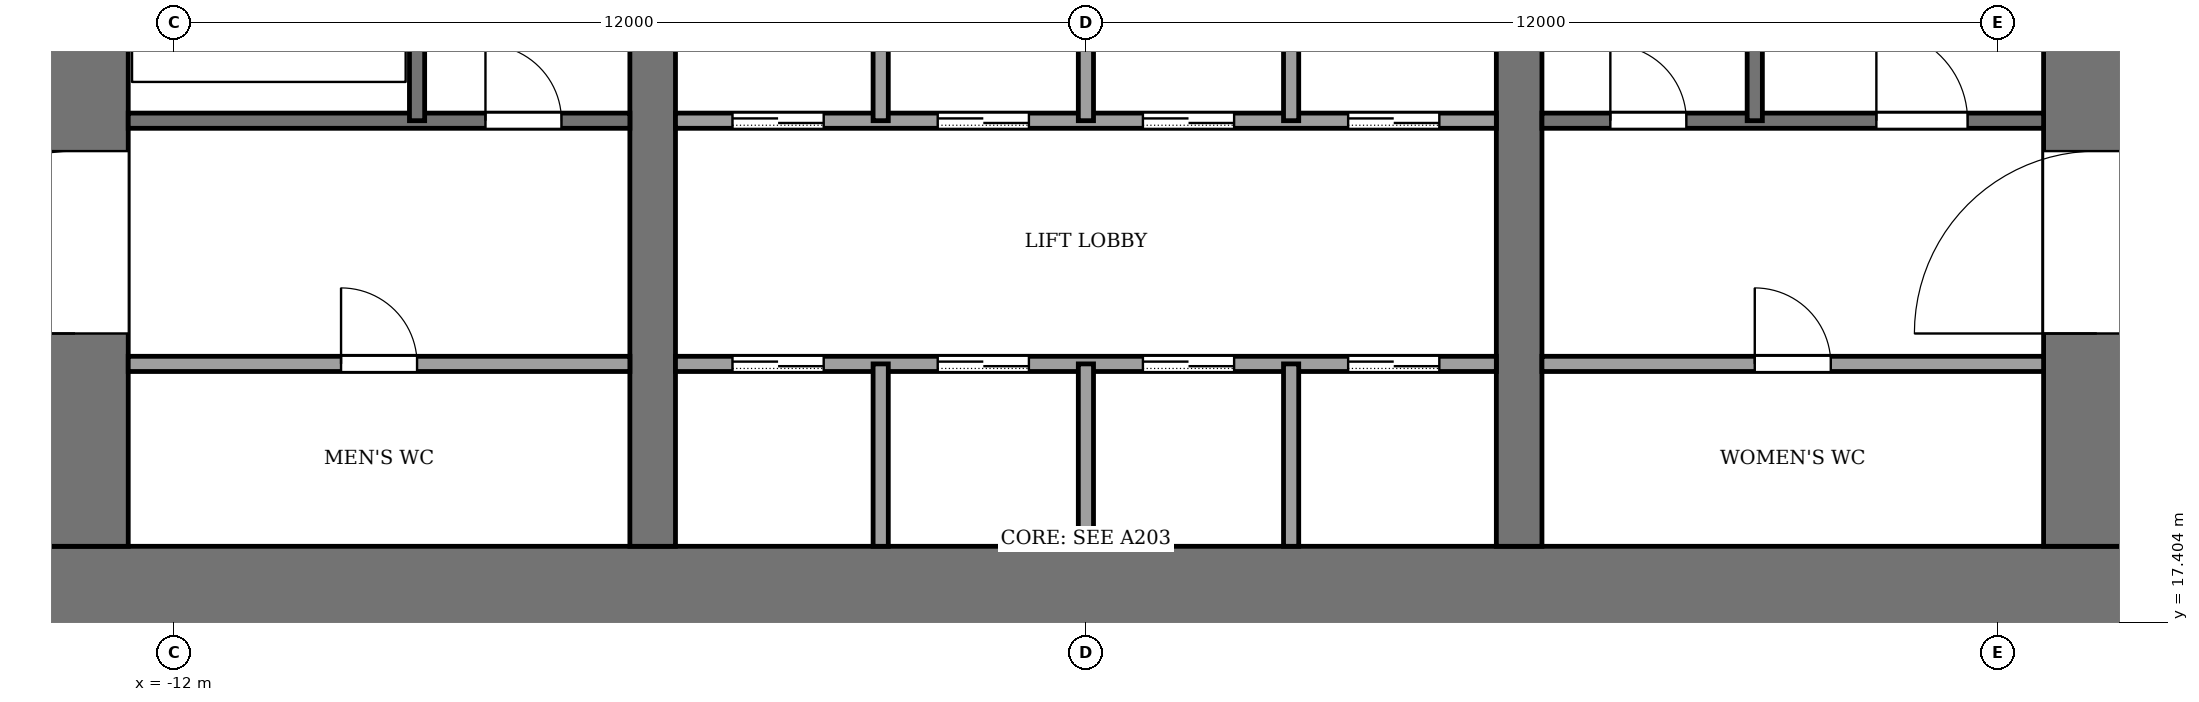
"""IFC4 building model, lengths in metres.
Left out: names, types, materials, properties, quantities, classifications, styles, units other than length and angle.
Written with IfcOpenShell. Run it as: python <this file> out.ifc"""

import sys

from ifc_helpers import new_model, si_unit, direction, frame, frame_2d, origin, place, context, subcontext, project, spatial, rectangle, extrude, element, fill, save


model = new_model("IFC4")
c1 = context("Model", 3, precision=1e-05, world=origin(), true_north=direction((0.0, 1.0)))
c2 = subcontext(c1, "Body", "Model", "MODEL_VIEW")
j1 = project(units=[si_unit("LENGTHUNIT", "METRE"), si_unit("PLANEANGLEUNIT", "RADIAN")], contexts=[c1])
p1 = place(None, origin())
s1 = spatial("IfcSite", under=j1, at=p1, CompositionType="ELEMENT")
p2 = place(p1, origin())
s2 = spatial("IfcBuilding", under=s1, at=p2, CompositionType="ELEMENT")
p3 = place(p2, frame((0.0, 0.0, 9.0)))
s3 = spatial("IfcBuildingStorey", under=s2, at=p3, CompositionType="ELEMENT", Elevation=9.0)
p4 = place(p3, frame((-14.0, 17.7, -0.13), z_axis=(0.0, 0.0, 1.0), x_axis=(1.0, 0.0, 0.0)))
e1 = element("IfcWall", 1, at=p4, inside=s3, PredefinedType="SHEAR", context=c2, shape_type="SweptSolid", body=[
    extrude(rectangle(XDim=28.0, YDim=1.4, at=frame_2d((14.0, 0.0))), origin(), (0.0, 0.0, 1.0), 5.0),
])
p5 = place(p3, frame((-13.3, 18.4, -0.13), z_axis=(0.0, 0.0, 1.0), x_axis=(0.0, 1.0, 0.0)))
e2 = element("IfcWall", 2, at=p5, inside=s3, PredefinedType="SHEAR", context=c2, shape_type="SweptSolid", body=[
    extrude(rectangle(XDim=19.2, YDim=1.4, at=frame_2d((9.6, 0.0))), origin(), (0.0, 0.0, 1.0), 5.0),
])
p6 = place(p5, frame((2.8, 0.0, 0.13)))
e3 = element("IfcOpeningElement", 3, at=p6, cuts=e2, PredefinedType="OPENING", context=c2, shape_type="SweptSolid", body=[
    extrude(rectangle(XDim=2.4, YDim=2.4, at=frame_2d((1.2, 1.2))), frame((0.0, 0.71, 0.0), z_axis=(0.0, -1.0, 0.0), x_axis=(1.0, 0.0, 0.0)), (0.0, 0.0, 1.0), 1.42),
])
p7 = place(p5, frame((13.4, 0.0, 0.13)))
e4 = element("IfcOpeningElement", 4, at=p7, cuts=e2, PredefinedType="OPENING", context=c2, shape_type="SweptSolid", body=[
    extrude(rectangle(XDim=1.4, YDim=2.2, at=frame_2d((0.7, 1.1))), frame((0.0, 0.71, 0.0), z_axis=(0.0, -1.0, 0.0), x_axis=(1.0, 0.0, 0.0)), (0.0, 0.0, 1.0), 1.42),
])
p8 = place(p3, frame((13.3, 18.4, -0.13), z_axis=(0.0, 0.0, 1.0), x_axis=(0.0, 1.0, 0.0)))
e5 = element("IfcWall", 5, at=p8, inside=s3, PredefinedType="SHEAR", context=c2, shape_type="SweptSolid", body=[
    extrude(rectangle(XDim=19.2, YDim=1.4, at=frame_2d((9.6, 0.0))), origin(), (0.0, 0.0, 1.0), 5.0),
])
p9 = place(p8, frame((2.8, 0.0, 0.13)))
e6 = element("IfcOpeningElement", 6, at=p9, cuts=e5, PredefinedType="OPENING", context=c2, shape_type="SweptSolid", body=[
    extrude(rectangle(XDim=2.4, YDim=2.4, at=frame_2d((1.2, 1.2))), frame((0.0, 0.71, 0.0), z_axis=(0.0, -1.0, 0.0), x_axis=(1.0, 0.0, 0.0)), (0.0, 0.0, 1.0), 1.42),
])
p10 = place(p8, frame((13.3, 0.0, 0.13)))
e7 = element("IfcOpeningElement", 7, at=p10, cuts=e5, PredefinedType="OPENING", context=c2, shape_type="SweptSolid", body=[
    extrude(rectangle(XDim=2.4, YDim=2.4, at=frame_2d((1.2, 1.2))), frame((0.0, 0.71, 0.0), z_axis=(0.0, -1.0, 0.0), x_axis=(1.0, 0.0, 0.0)), (0.0, 0.0, 1.0), 1.42),
])
p11 = place(p3, frame((-5.7, 18.4, -0.13), z_axis=(0.0, 0.0, 1.0), x_axis=(0.0, 1.0, 0.0)))
e8 = element("IfcWall", 8, at=p11, inside=s3, PredefinedType="SHEAR", context=c2, shape_type="SweptSolid", body=[
    extrude(rectangle(XDim=19.2, YDim=0.6, at=frame_2d((9.6, 0.0))), origin(), (0.0, 0.0, 1.0), 5.0),
])
p12 = place(p11, frame((8.35, 0.0, 0.13)))
e9 = element("IfcOpeningElement", 9, at=p12, cuts=e8, PredefinedType="OPENING", context=c2, shape_type="SweptSolid", body=[
    extrude(rectangle(XDim=0.9, YDim=2.1, at=frame_2d((0.45, 1.05))), frame((0.0, 0.31, 0.0), z_axis=(0.0, -1.0, 0.0), x_axis=(1.0, 0.0, 0.0)), (0.0, 0.0, 1.0), 0.62),
])
p13 = place(p3, frame((5.7, 18.4, -0.13), z_axis=(0.0, 0.0, 1.0), x_axis=(0.0, 1.0, 0.0)))
e10 = element("IfcWall", 10, at=p13, inside=s3, PredefinedType="SHEAR", context=c2, shape_type="SweptSolid", body=[
    extrude(rectangle(XDim=19.2, YDim=0.6, at=frame_2d((9.6, 0.0))), origin(), (0.0, 0.0, 1.0), 5.0),
])
p14 = place(p13, frame((13.3, 0.0, 0.13)))
e11 = element("IfcOpeningElement", 11, at=p14, cuts=e10, PredefinedType="OPENING", context=c2, shape_type="SweptSolid", body=[
    extrude(rectangle(XDim=2.4, YDim=2.4, at=frame_2d((1.2, 1.2))), frame((0.0, 0.31, 0.0), z_axis=(0.0, -1.0, 0.0), x_axis=(1.0, 0.0, 0.0)), (0.0, 0.0, 1.0), 0.62),
])
p15 = place(p3, frame((-12.6, 20.8, 0.0), z_axis=(0.0, 0.0, 1.0), x_axis=(1.0, 0.0, 0.0)))
e12 = element("IfcWall", 12, at=p15, inside=s3, PredefinedType="PARTITIONING", context=c2, shape_type="SweptSolid", body=[
    extrude(rectangle(XDim=6.6, YDim=0.2, at=frame_2d((3.3, 0.0))), origin(), (0.0, 0.0, 1.0), 4.87),
])
p16 = place(p15, frame((2.8, 0.0, 0.0)))
e13 = element("IfcOpeningElement", 13, at=p16, cuts=e12, PredefinedType="OPENING", context=c2, shape_type="SweptSolid", body=[
    extrude(rectangle(XDim=1.0, YDim=2.1, at=frame_2d((0.5, 1.05))), frame((0.0, 0.11, 0.0), z_axis=(0.0, -1.0, 0.0), x_axis=(1.0, 0.0, 0.0)), (0.0, 0.0, 1.0), 0.22),
])
p17 = place(p3, frame((-5.4, 20.8, 0.0), z_axis=(0.0, 0.0, 1.0), x_axis=(1.0, 0.0, 0.0)))
e14 = element("IfcWall", 14, at=p17, inside=s3, PredefinedType="PARTITIONING", context=c2, shape_type="SweptSolid", body=[
    extrude(rectangle(XDim=10.8, YDim=0.2, at=frame_2d((5.4, 0.0))), origin(), (0.0, 0.0, 1.0), 4.87),
])
p18 = place(p17, frame((0.75, 0.0, 0.0)))
e15 = element("IfcOpeningElement", 15, at=p18, cuts=e14, PredefinedType="OPENING", context=c2, shape_type="SweptSolid", body=[
    extrude(rectangle(XDim=1.2, YDim=2.2, at=frame_2d((0.6, 1.1))), frame((0.0, 0.11, 0.0), z_axis=(0.0, -1.0, 0.0), x_axis=(1.0, 0.0, 0.0)), (0.0, 0.0, 1.0), 0.22),
])
p19 = place(p17, frame((3.45, 0.0, 0.0)))
e16 = element("IfcOpeningElement", 16, at=p19, cuts=e14, PredefinedType="OPENING", context=c2, shape_type="SweptSolid", body=[
    extrude(rectangle(XDim=1.2, YDim=2.2, at=frame_2d((0.6, 1.1))), frame((0.0, 0.11, 0.0), z_axis=(0.0, -1.0, 0.0), x_axis=(1.0, 0.0, 0.0)), (0.0, 0.0, 1.0), 0.22),
])
p20 = place(p17, frame((6.15, 0.0, 0.0)))
e17 = element("IfcOpeningElement", 17, at=p20, cuts=e14, PredefinedType="OPENING", context=c2, shape_type="SweptSolid", body=[
    extrude(rectangle(XDim=1.2, YDim=2.2, at=frame_2d((0.6, 1.1))), frame((0.0, 0.11, 0.0), z_axis=(0.0, -1.0, 0.0), x_axis=(1.0, 0.0, 0.0)), (0.0, 0.0, 1.0), 0.22),
])
p21 = place(p17, frame((8.85, 0.0, 0.0)))
e18 = element("IfcOpeningElement", 18, at=p21, cuts=e14, PredefinedType="OPENING", context=c2, shape_type="SweptSolid", body=[
    extrude(rectangle(XDim=1.2, YDim=2.2, at=frame_2d((0.6, 1.1))), frame((0.0, 0.11, 0.0), z_axis=(0.0, -1.0, 0.0), x_axis=(1.0, 0.0, 0.0)), (0.0, 0.0, 1.0), 0.22),
])
p22 = place(p3, frame((6.0, 20.8, 0.0), z_axis=(0.0, 0.0, 1.0), x_axis=(1.0, 0.0, 0.0)))
e19 = element("IfcWall", 19, at=p22, inside=s3, PredefinedType="PARTITIONING", context=c2, shape_type="SweptSolid", body=[
    extrude(rectangle(XDim=6.6, YDim=0.2, at=frame_2d((3.3, 0.0))), origin(), (0.0, 0.0, 1.0), 4.87),
])
p23 = place(p22, frame((2.8, 0.0, 0.0)))
e20 = element("IfcOpeningElement", 20, at=p23, cuts=e19, PredefinedType="OPENING", context=c2, shape_type="SweptSolid", body=[
    extrude(rectangle(XDim=1.0, YDim=2.1, at=frame_2d((0.5, 1.05))), frame((0.0, 0.11, 0.0), z_axis=(0.0, -1.0, 0.0), x_axis=(1.0, 0.0, 0.0)), (0.0, 0.0, 1.0), 0.22),
])
p24 = place(p3, frame((-12.6, 24.0, 0.0), z_axis=(0.0, 0.0, 1.0), x_axis=(1.0, 0.0, 0.0)))
e21 = element("IfcWall", 21, at=p24, inside=s3, PredefinedType="PARTITIONING", context=c2, shape_type="SweptSolid", body=[
    extrude(rectangle(XDim=6.6, YDim=0.2, at=frame_2d((3.3, 0.0))), origin(), (0.0, 0.0, 1.0), 4.87),
])
p25 = place(p24, frame((4.7, 0.0, 0.0)))
e22 = element("IfcOpeningElement", 22, at=p25, cuts=e21, PredefinedType="OPENING", context=c2, shape_type="SweptSolid", body=[
    extrude(rectangle(XDim=1.0, YDim=2.1, at=frame_2d((0.5, 1.05))), frame((0.0, 0.11, 0.0), z_axis=(0.0, -1.0, 0.0), x_axis=(1.0, 0.0, 0.0)), (0.0, 0.0, 1.0), 0.22),
])
p26 = place(p3, frame((-5.4, 24.0, 0.0), z_axis=(0.0, 0.0, 1.0), x_axis=(1.0, 0.0, 0.0)))
e23 = element("IfcWall", 23, at=p26, inside=s3, PredefinedType="PARTITIONING", context=c2, shape_type="SweptSolid", body=[
    extrude(rectangle(XDim=10.8, YDim=0.2, at=frame_2d((5.4, 0.0))), origin(), (0.0, 0.0, 1.0), 4.87),
])
p27 = place(p26, frame((0.75, 0.0, 0.0)))
e24 = element("IfcOpeningElement", 24, at=p27, cuts=e23, PredefinedType="OPENING", context=c2, shape_type="SweptSolid", body=[
    extrude(rectangle(XDim=1.2, YDim=2.2, at=frame_2d((0.6, 1.1))), frame((0.0, 0.11, 0.0), z_axis=(0.0, -1.0, 0.0), x_axis=(1.0, 0.0, 0.0)), (0.0, 0.0, 1.0), 0.22),
])
p28 = place(p26, frame((3.45, 0.0, 0.0)))
e25 = element("IfcOpeningElement", 25, at=p28, cuts=e23, PredefinedType="OPENING", context=c2, shape_type="SweptSolid", body=[
    extrude(rectangle(XDim=1.2, YDim=2.2, at=frame_2d((0.6, 1.1))), frame((0.0, 0.11, 0.0), z_axis=(0.0, -1.0, 0.0), x_axis=(1.0, 0.0, 0.0)), (0.0, 0.0, 1.0), 0.22),
])
p29 = place(p26, frame((6.15, 0.0, 0.0)))
e26 = element("IfcOpeningElement", 26, at=p29, cuts=e23, PredefinedType="OPENING", context=c2, shape_type="SweptSolid", body=[
    extrude(rectangle(XDim=1.2, YDim=2.2, at=frame_2d((0.6, 1.1))), frame((0.0, 0.11, 0.0), z_axis=(0.0, -1.0, 0.0), x_axis=(1.0, 0.0, 0.0)), (0.0, 0.0, 1.0), 0.22),
])
p30 = place(p26, frame((8.85, 0.0, 0.0)))
e27 = element("IfcOpeningElement", 27, at=p30, cuts=e23, PredefinedType="OPENING", context=c2, shape_type="SweptSolid", body=[
    extrude(rectangle(XDim=1.2, YDim=2.2, at=frame_2d((0.6, 1.1))), frame((0.0, 0.11, 0.0), z_axis=(0.0, -1.0, 0.0), x_axis=(1.0, 0.0, 0.0)), (0.0, 0.0, 1.0), 0.22),
])
p31 = place(p3, frame((6.0, 24.0, 0.0), z_axis=(0.0, 0.0, 1.0), x_axis=(1.0, 0.0, 0.0)))
e28 = element("IfcWall", 28, at=p31, inside=s3, PredefinedType="PARTITIONING", context=c2, shape_type="SweptSolid", body=[
    extrude(rectangle(XDim=6.6, YDim=0.2, at=frame_2d((3.3, 0.0))), origin(), (0.0, 0.0, 1.0), 4.87),
])
p32 = place(p31, frame((0.9, 0.0, 0.0)))
e29 = element("IfcOpeningElement", 29, at=p32, cuts=e28, PredefinedType="OPENING", context=c2, shape_type="SweptSolid", body=[
    extrude(rectangle(XDim=1.0, YDim=2.1, at=frame_2d((0.5, 1.05))), frame((0.0, 0.11, 0.0), z_axis=(0.0, -1.0, 0.0), x_axis=(1.0, 0.0, 0.0)), (0.0, 0.0, 1.0), 0.22),
])
p33 = place(p31, frame((4.4, 0.0, 0.0)))
e30 = element("IfcOpeningElement", 30, at=p33, cuts=e28, PredefinedType="OPENING", context=c2, shape_type="SweptSolid", body=[
    extrude(rectangle(XDim=1.2, YDim=2.2, at=frame_2d((0.6, 1.1))), frame((0.0, 0.11, 0.0), z_axis=(0.0, -1.0, 0.0), x_axis=(1.0, 0.0, 0.0)), (0.0, 0.0, 1.0), 0.22),
])
p34 = place(p3, frame((-8.8, 24.0, 0.0), z_axis=(0.0, 0.0, 1.0), x_axis=(0.0, 1.0, 0.0)))
e31 = element("IfcWall", 31, at=p34, inside=s3, PredefinedType="PARTITIONING", context=c2, shape_type="SweptSolid", body=[
    extrude(rectangle(XDim=7.4, YDim=0.2, at=frame_2d((3.7, 0.0))), origin(), (0.0, 0.0, 1.0), 4.87),
])
p35 = place(p3, frame((-2.7, 18.4, 0.0), z_axis=(0.0, 0.0, 1.0), x_axis=(0.0, 1.0, 0.0)))
e32 = element("IfcWall", 32, at=p35, inside=s3, PredefinedType="PARTITIONING", context=c2, shape_type="SweptSolid", body=[
    extrude(rectangle(XDim=2.4, YDim=0.2, at=frame_2d((1.2, 0.0))), origin(), (0.0, 0.0, 1.0), 4.87),
])
p36 = place(p3, frame((-2.7, 24.0, 0.0), z_axis=(0.0, 0.0, 1.0), x_axis=(0.0, 1.0, 0.0)))
e33 = element("IfcWall", 33, at=p36, inside=s3, PredefinedType="PARTITIONING", context=c2, shape_type="SweptSolid", body=[
    extrude(rectangle(XDim=2.4, YDim=0.2, at=frame_2d((1.2, 0.0))), origin(), (0.0, 0.0, 1.0), 4.87),
])
p37 = place(p3, frame((0.0, 18.4, 0.0), z_axis=(0.0, 0.0, 1.0), x_axis=(0.0, 1.0, 0.0)))
e34 = element("IfcWall", 34, at=p37, inside=s3, PredefinedType="PARTITIONING", context=c2, shape_type="SweptSolid", body=[
    extrude(rectangle(XDim=2.4, YDim=0.2, at=frame_2d((1.2, 0.0))), origin(), (0.0, 0.0, 1.0), 4.87),
])
p38 = place(p3, frame((0.0, 24.0, 0.0), z_axis=(0.0, 0.0, 1.0), x_axis=(0.0, 1.0, 0.0)))
e35 = element("IfcWall", 35, at=p38, inside=s3, PredefinedType="PARTITIONING", context=c2, shape_type="SweptSolid", body=[
    extrude(rectangle(XDim=2.4, YDim=0.2, at=frame_2d((1.2, 0.0))), origin(), (0.0, 0.0, 1.0), 4.87),
])
p39 = place(p3, frame((2.7, 18.4, 0.0), z_axis=(0.0, 0.0, 1.0), x_axis=(0.0, 1.0, 0.0)))
e36 = element("IfcWall", 36, at=p39, inside=s3, PredefinedType="PARTITIONING", context=c2, shape_type="SweptSolid", body=[
    extrude(rectangle(XDim=2.4, YDim=0.2, at=frame_2d((1.2, 0.0))), origin(), (0.0, 0.0, 1.0), 4.87),
])
p40 = place(p3, frame((2.7, 24.0, 0.0), z_axis=(0.0, 0.0, 1.0), x_axis=(0.0, 1.0, 0.0)))
e37 = element("IfcWall", 37, at=p40, inside=s3, PredefinedType="PARTITIONING", context=c2, shape_type="SweptSolid", body=[
    extrude(rectangle(XDim=2.4, YDim=0.2, at=frame_2d((1.2, 0.0))), origin(), (0.0, 0.0, 1.0), 4.87),
])
p41 = place(p3, frame((8.8, 24.0, 0.0), z_axis=(0.0, 0.0, 1.0), x_axis=(0.0, 1.0, 0.0)))
e38 = element("IfcWall", 38, at=p41, inside=s3, PredefinedType="PARTITIONING", context=c2, shape_type="SweptSolid", body=[
    extrude(rectangle(XDim=7.4, YDim=0.2, at=frame_2d((3.7, 0.0))), origin(), (0.0, 0.0, 1.0), 4.87),
])
p42 = place(p18, origin())
e39 = element("IfcDoor", 39, at=p42, inside=s3, OperationType="SLIDING_TO_LEFT", PredefinedType="DOOR", context=c2, shape_type="SweptSolid", body=[
    extrude(rectangle(XDim=1.2, YDim=2.2, at=frame_2d((0.6, 1.1))), frame((0.0, 0.025, 0.0), z_axis=(0.0, -1.0, 0.0), x_axis=(1.0, 0.0, 0.0)), (0.0, 0.0, 1.0), 0.05),
])
fill(e15, e39)
p43 = place(p19, origin())
e40 = element("IfcDoor", 40, at=p43, inside=s3, OperationType="SLIDING_TO_LEFT", PredefinedType="DOOR", context=c2, shape_type="SweptSolid", body=[
    extrude(rectangle(XDim=1.2, YDim=2.2, at=frame_2d((0.6, 1.1))), frame((0.0, 0.025, 0.0), z_axis=(0.0, -1.0, 0.0), x_axis=(1.0, 0.0, 0.0)), (0.0, 0.0, 1.0), 0.05),
])
fill(e16, e40)
p44 = place(p20, origin())
e41 = element("IfcDoor", 41, at=p44, inside=s3, OperationType="SLIDING_TO_LEFT", PredefinedType="DOOR", context=c2, shape_type="SweptSolid", body=[
    extrude(rectangle(XDim=1.2, YDim=2.2, at=frame_2d((0.6, 1.1))), frame((0.0, 0.025, 0.0), z_axis=(0.0, -1.0, 0.0), x_axis=(1.0, 0.0, 0.0)), (0.0, 0.0, 1.0), 0.05),
])
fill(e17, e41)
p45 = place(p21, origin())
e42 = element("IfcDoor", 42, at=p45, inside=s3, OperationType="SLIDING_TO_LEFT", PredefinedType="DOOR", context=c2, shape_type="SweptSolid", body=[
    extrude(rectangle(XDim=1.2, YDim=2.2, at=frame_2d((0.6, 1.1))), frame((0.0, 0.025, 0.0), z_axis=(0.0, -1.0, 0.0), x_axis=(1.0, 0.0, 0.0)), (0.0, 0.0, 1.0), 0.05),
])
fill(e18, e42)
p46 = place(p27, origin())
e43 = element("IfcDoor", 43, at=p46, inside=s3, OperationType="SLIDING_TO_LEFT", PredefinedType="DOOR", context=c2, shape_type="SweptSolid", body=[
    extrude(rectangle(XDim=1.2, YDim=2.2, at=frame_2d((0.6, 1.1))), frame((0.0, 0.025, 0.0), z_axis=(0.0, -1.0, 0.0), x_axis=(1.0, 0.0, 0.0)), (0.0, 0.0, 1.0), 0.05),
])
fill(e24, e43)
p47 = place(p28, origin())
e44 = element("IfcDoor", 44, at=p47, inside=s3, OperationType="SLIDING_TO_LEFT", PredefinedType="DOOR", context=c2, shape_type="SweptSolid", body=[
    extrude(rectangle(XDim=1.2, YDim=2.2, at=frame_2d((0.6, 1.1))), frame((0.0, 0.025, 0.0), z_axis=(0.0, -1.0, 0.0), x_axis=(1.0, 0.0, 0.0)), (0.0, 0.0, 1.0), 0.05),
])
fill(e25, e44)
p48 = place(p29, origin())
e45 = element("IfcDoor", 45, at=p48, inside=s3, OperationType="SLIDING_TO_LEFT", PredefinedType="DOOR", context=c2, shape_type="SweptSolid", body=[
    extrude(rectangle(XDim=1.2, YDim=2.2, at=frame_2d((0.6, 1.1))), frame((0.0, 0.025, 0.0), z_axis=(0.0, -1.0, 0.0), x_axis=(1.0, 0.0, 0.0)), (0.0, 0.0, 1.0), 0.05),
])
fill(e26, e45)
p49 = place(p30, origin())
e46 = element("IfcDoor", 46, at=p49, inside=s3, OperationType="SLIDING_TO_LEFT", PredefinedType="DOOR", context=c2, shape_type="SweptSolid", body=[
    extrude(rectangle(XDim=1.2, YDim=2.2, at=frame_2d((0.6, 1.1))), frame((0.0, 0.025, 0.0), z_axis=(0.0, -1.0, 0.0), x_axis=(1.0, 0.0, 0.0)), (0.0, 0.0, 1.0), 0.05),
])
fill(e27, e46)
p50 = place(p16, origin())
e47 = element("IfcDoor", 47, at=p50, inside=s3, OperationType="SINGLE_SWING_LEFT", PredefinedType="DOOR", context=c2, shape_type="SweptSolid", body=[
    extrude(rectangle(XDim=1.0, YDim=2.1, at=frame_2d((0.5, 1.05))), frame((0.0, 0.025, 0.0), z_axis=(0.0, -1.0, 0.0), x_axis=(1.0, 0.0, 0.0)), (0.0, 0.0, 1.0), 0.05),
])
fill(e13, e47)
p51 = place(p23, origin())
e48 = element("IfcDoor", 48, at=p51, inside=s3, OperationType="SINGLE_SWING_RIGHT", PredefinedType="DOOR", context=c2, shape_type="SweptSolid", body=[
    extrude(rectangle(XDim=1.0, YDim=2.1, at=frame_2d((0.5, 1.05))), frame((0.0, 0.025, 0.0), z_axis=(0.0, -1.0, 0.0), x_axis=(1.0, 0.0, 0.0)), (0.0, 0.0, 1.0), 0.05),
])
fill(e20, e48)
p52 = place(p25, origin())
e49 = element("IfcDoor", 49, at=p52, inside=s3, OperationType="SINGLE_SWING_RIGHT", PredefinedType="DOOR", context=c2, shape_type="SweptSolid", body=[
    extrude(rectangle(XDim=1.0, YDim=2.1, at=frame_2d((0.5, 1.05))), frame((0.0, 0.025, 0.0), z_axis=(0.0, -1.0, 0.0), x_axis=(1.0, 0.0, 0.0)), (0.0, 0.0, 1.0), 0.05),
])
fill(e22, e49)
p53 = place(p32, origin())
e50 = element("IfcDoor", 50, at=p53, inside=s3, OperationType="SINGLE_SWING_LEFT", PredefinedType="DOOR", context=c2, shape_type="SweptSolid", body=[
    extrude(rectangle(XDim=1.0, YDim=2.1, at=frame_2d((0.5, 1.05))), frame((0.0, 0.025, 0.0), z_axis=(0.0, -1.0, 0.0), x_axis=(1.0, 0.0, 0.0)), (0.0, 0.0, 1.0), 0.05),
])
fill(e29, e50)
p54 = place(p33, origin())
e51 = element("IfcDoor", 51, at=p54, inside=s3, OperationType="SINGLE_SWING_LEFT", PredefinedType="DOOR", context=c2, shape_type="SweptSolid", body=[
    extrude(rectangle(XDim=1.2, YDim=2.2, at=frame_2d((0.6, 1.1))), frame((0.0, 0.025, 0.0), z_axis=(0.0, -1.0, 0.0), x_axis=(1.0, 0.0, 0.0)), (0.0, 0.0, 1.0), 0.05),
])
fill(e30, e51)
p55 = place(p6, origin())
e52 = element("IfcDoor", 52, at=p55, inside=s3, OperationType="DOUBLE_DOOR_SINGLE_SWING", PredefinedType="DOOR", context=c2, shape_type="SweptSolid", body=[
    extrude(rectangle(XDim=2.4, YDim=2.4, at=frame_2d((1.2, 1.2))), frame((0.0, 0.025, 0.0), z_axis=(0.0, -1.0, 0.0), x_axis=(1.0, 0.0, 0.0)), (0.0, 0.0, 1.0), 0.05),
])
fill(e3, e52)
p56 = place(p9, origin())
e53 = element("IfcDoor", 53, at=p56, inside=s3, OperationType="DOUBLE_DOOR_SINGLE_SWING", PredefinedType="DOOR", context=c2, shape_type="SweptSolid", body=[
    extrude(rectangle(XDim=2.4, YDim=2.4, at=frame_2d((1.2, 1.2))), frame((0.0, 0.025, 0.0), z_axis=(0.0, -1.0, 0.0), x_axis=(1.0, 0.0, 0.0)), (0.0, 0.0, 1.0), 0.05),
])
fill(e6, e53)
save(model, sys.argv[1])
